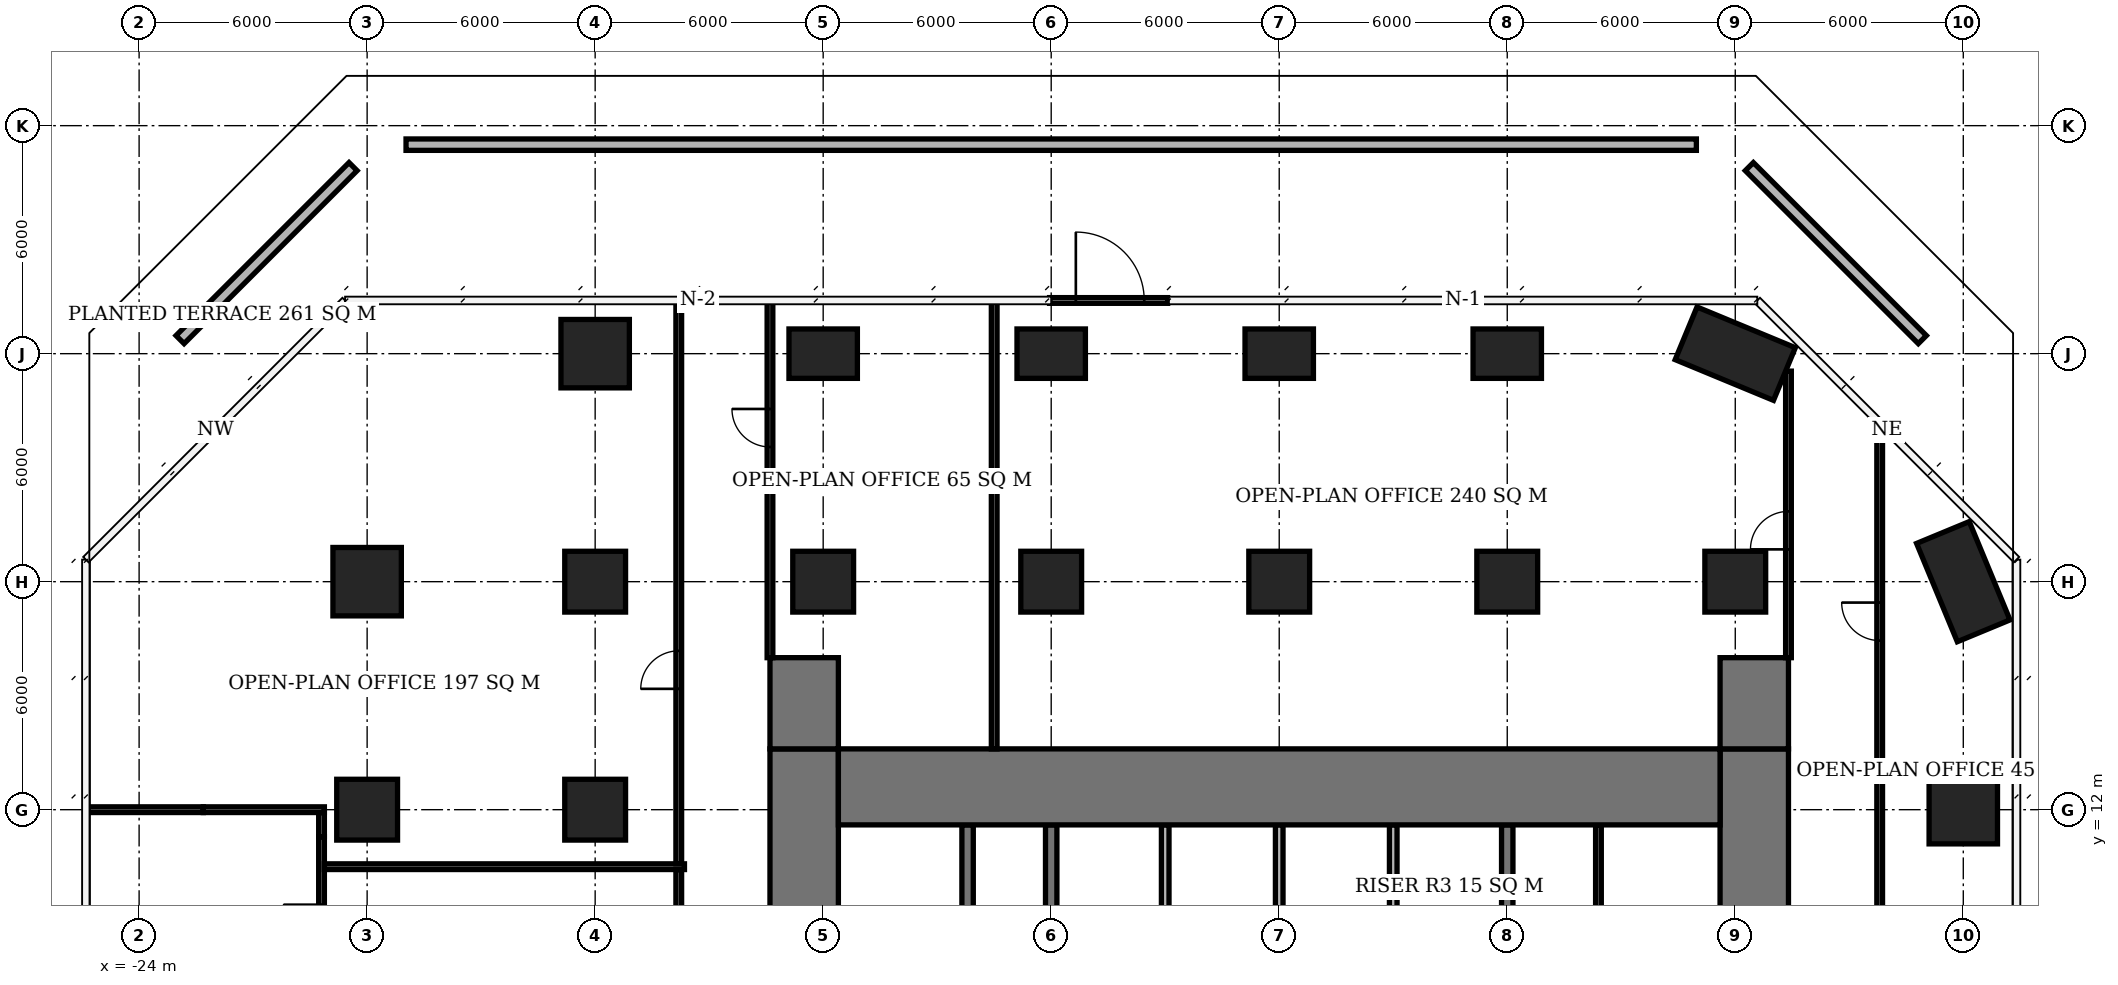
"""IFC4 building model, lengths in metres.
Left out: names, types, materials, properties, quantities, classifications, styles, units other than length and angle.
Written with IfcOpenShell. Run it as: python <this file> out.ifc"""

import sys

from ifc_helpers import new_model, si_unit, direction, frame, frame_2d, origin, origin_2d, place, context, subcontext, project, spatial, rectangle, extrude, element, fill, save


model = new_model("IFC4")
c1 = context("Model", 3, precision=1e-05, world=origin(), true_north=direction((0.0, 1.0)))
c2 = subcontext(c1, "Body", "Model", "MODEL_VIEW")
j1 = project(units=[si_unit("LENGTHUNIT", "METRE"), si_unit("PLANEANGLEUNIT", "RADIAN")], contexts=[c1])
p1 = place(None, origin())
s1 = spatial("IfcSite", under=j1, at=p1, CompositionType="ELEMENT")
p2 = place(p1, origin())
s2 = spatial("IfcBuilding", under=s1, at=p2, CompositionType="ELEMENT")
p3 = place(p2, frame((0.0, 0.0, 117.2)))
s3 = spatial("IfcBuildingStorey", under=s2, at=p3, CompositionType="ELEMENT", Elevation=117.2)
p4 = place(p3, frame((-18.0, 12.0, 0.0), z_axis=(0.0, 0.0, 1.0), x_axis=(1.0, 0.0, 0.0)))
e1 = element("IfcColumn", 1, at=p4, inside=s3, PredefinedType="COLUMN", context=c2, shape_type="SweptSolid", body=[
    extrude(rectangle(XDim=1.6, YDim=1.6, at=origin_2d()), origin(), (0.0, 0.0, 1.0), 3.9),
])
p5 = place(p3, frame((-18.0, 18.0, 0.0), z_axis=(0.0, 0.0, 1.0), x_axis=(1.0, 0.0, 0.0)))
e2 = element("IfcColumn", 2, at=p5, inside=s3, PredefinedType="COLUMN", context=c2, shape_type="SweptSolid", body=[
    extrude(rectangle(XDim=1.8, YDim=1.8, at=origin_2d()), origin(), (0.0, 0.0, 1.0), 3.9),
])
for number, where, z_axis, x_axis in (
    (3, (-12.0, 12.0, 0.0), (0.0, 0.0, 1.0), (1.0, 0.0, 0.0)),
    (4, (-12.0, 18.0, 0.0), (0.0, 0.0, 1.0), (1.0, 0.0, 0.0)),
):
    element("IfcColumn", number, at=place(p3, frame(where, z_axis=z_axis, x_axis=x_axis)), inside=s3, PredefinedType="COLUMN", context=c2, shape_type="SweptSolid", body=[
        extrude(rectangle(XDim=1.6, YDim=1.6, at=origin_2d()), origin(), (0.0, 0.0, 1.0), 3.9),
    ])
p6 = place(p3, frame((-12.0, 24.0, 0.0), z_axis=(0.0, 0.0, 1.0), x_axis=(1.0, 0.0, 0.0)))
e5 = element("IfcColumn", 5, at=p6, inside=s3, PredefinedType="COLUMN", context=c2, shape_type="SweptSolid", body=[
    extrude(rectangle(XDim=1.8, YDim=1.8, at=origin_2d()), origin(), (0.0, 0.0, 1.0), 3.9),
])
p7 = place(p3, frame((-6.0, 18.0, 0.0), z_axis=(0.0, 0.0, 1.0), x_axis=(1.0, 0.0, 0.0)))
e6 = element("IfcColumn", 6, at=p7, inside=s3, PredefinedType="COLUMN", context=c2, shape_type="SweptSolid", body=[
    extrude(rectangle(XDim=1.6, YDim=1.6, at=origin_2d()), origin(), (0.0, 0.0, 1.0), 3.9),
])
p8 = place(p3, frame((-6.0, 24.0, 0.0), z_axis=(0.0, 0.0, 1.0), x_axis=(1.0, 0.0, 0.0)))
e7 = element("IfcColumn", 7, at=p8, inside=s3, PredefinedType="COLUMN", context=c2, shape_type="SweptSolid", body=[
    extrude(rectangle(XDim=1.8, YDim=1.3, at=origin_2d()), origin(), (0.0, 0.0, 1.0), 3.9),
])
p9 = place(p3, frame((0.0, 18.0, 0.0), z_axis=(0.0, 0.0, 1.0), x_axis=(1.0, 0.0, 0.0)))
e8 = element("IfcColumn", 8, at=p9, inside=s3, PredefinedType="COLUMN", context=c2, shape_type="SweptSolid", body=[
    extrude(rectangle(XDim=1.6, YDim=1.6, at=origin_2d()), origin(), (0.0, 0.0, 1.0), 3.9),
])
p10 = place(p3, frame((0.0, 24.0, 0.0), z_axis=(0.0, 0.0, 1.0), x_axis=(1.0, 0.0, 0.0)))
e9 = element("IfcColumn", 9, at=p10, inside=s3, PredefinedType="COLUMN", context=c2, shape_type="SweptSolid", body=[
    extrude(rectangle(XDim=1.8, YDim=1.3, at=origin_2d()), origin(), (0.0, 0.0, 1.0), 3.9),
])
p11 = place(p3, frame((6.0, 18.0, 0.0), z_axis=(0.0, 0.0, 1.0), x_axis=(1.0, 0.0, 0.0)))
e10 = element("IfcColumn", 10, at=p11, inside=s3, PredefinedType="COLUMN", context=c2, shape_type="SweptSolid", body=[
    extrude(rectangle(XDim=1.6, YDim=1.6, at=origin_2d()), origin(), (0.0, 0.0, 1.0), 3.9),
])
p12 = place(p3, frame((6.0, 24.0, 0.0), z_axis=(0.0, 0.0, 1.0), x_axis=(1.0, 0.0, 0.0)))
e11 = element("IfcColumn", 11, at=p12, inside=s3, PredefinedType="COLUMN", context=c2, shape_type="SweptSolid", body=[
    extrude(rectangle(XDim=1.8, YDim=1.3, at=origin_2d()), origin(), (0.0, 0.0, 1.0), 3.9),
])
p13 = place(p3, frame((12.0, 18.0, 0.0), z_axis=(0.0, 0.0, 1.0), x_axis=(1.0, 0.0, 0.0)))
e12 = element("IfcColumn", 12, at=p13, inside=s3, PredefinedType="COLUMN", context=c2, shape_type="SweptSolid", body=[
    extrude(rectangle(XDim=1.6, YDim=1.6, at=origin_2d()), origin(), (0.0, 0.0, 1.0), 3.9),
])
p14 = place(p3, frame((12.0, 24.0, 0.0), z_axis=(0.0, 0.0, 1.0), x_axis=(1.0, 0.0, 0.0)))
e13 = element("IfcColumn", 13, at=p14, inside=s3, PredefinedType="COLUMN", context=c2, shape_type="SweptSolid", body=[
    extrude(rectangle(XDim=1.8, YDim=1.3, at=origin_2d()), origin(), (0.0, 0.0, 1.0), 3.9),
])
p15 = place(p3, frame((18.0, 18.0, 0.0), z_axis=(0.0, 0.0, 1.0), x_axis=(1.0, 0.0, 0.0)))
e14 = element("IfcColumn", 14, at=p15, inside=s3, PredefinedType="COLUMN", context=c2, shape_type="SweptSolid", body=[
    extrude(rectangle(XDim=1.6, YDim=1.6, at=origin_2d()), origin(), (0.0, 0.0, 1.0), 3.9),
])
p16 = place(p3, frame((18.0, 24.0, 0.0), z_axis=(0.0, 0.0, 1.0), x_axis=(0.923879532511, -0.382683432365, 0.0)))
e15 = element("IfcColumn", 15, at=p16, inside=s3, PredefinedType="COLUMN", context=c2, shape_type="SweptSolid", body=[
    extrude(rectangle(XDim=2.8, YDim=1.5, at=origin_2d()), origin(), (0.0, 0.0, 1.0), 3.9),
])
p17 = place(p3, frame((24.0, 12.0, 0.0), z_axis=(0.0, 0.0, 1.0), x_axis=(1.0, 0.0, 0.0)))
e16 = element("IfcColumn", 16, at=p17, inside=s3, PredefinedType="COLUMN", context=c2, shape_type="SweptSolid", body=[
    extrude(rectangle(XDim=1.8, YDim=1.8, at=origin_2d()), origin(), (0.0, 0.0, 1.0), 3.9),
])
p18 = place(p3, frame((24.0, 18.0, 0.0), z_axis=(0.0, 0.0, 1.0), x_axis=(0.382683432365, -0.923879532511, 0.0)))
e17 = element("IfcColumn", 17, at=p18, inside=s3, PredefinedType="COLUMN", context=c2, shape_type="SweptSolid", body=[
    extrude(rectangle(XDim=2.8, YDim=1.5, at=origin_2d()), origin(), (0.0, 0.0, 1.0), 3.9),
])
p19 = place(p3, frame((-5.6, 12.6, 0.0), z_axis=(0.0, 0.0, 1.0), x_axis=(1.0, 0.0, 0.0)))
e18 = element("IfcWall", 18, at=p19, inside=s3, PredefinedType="SHEAR", context=c2, shape_type="SweptSolid", body=[
    extrude(rectangle(XDim=23.2, YDim=2.0, at=frame_2d((11.6, 0.0))), origin(), (0.0, 0.0, 1.0), 3.9),
])
p20 = place(p3, frame((-6.5, -7.6, 0.0), z_axis=(0.0, 0.0, 1.0), x_axis=(0.0, 1.0, 0.0)))
e19 = element("IfcWall", 19, at=p20, inside=s3, PredefinedType="SHEAR", context=c2, shape_type="SweptSolid", body=[
    extrude(rectangle(XDim=21.2, YDim=1.8, at=frame_2d((10.6, 0.0))), origin(), (0.0, 0.0, 1.0), 3.9),
])
p21 = place(p20, frame((7.8, 0.0, 0.0)))
e20 = element("IfcOpeningElement", 20, at=p21, cuts=e19, PredefinedType="OPENING", context=c2, shape_type="SweptSolid", body=[
    extrude(rectangle(XDim=1.8, YDim=2.4, at=frame_2d((0.9, 1.2))), frame((0.0, 0.91, 0.0), z_axis=(0.0, -1.0, 0.0), x_axis=(1.0, 0.0, 0.0)), (0.0, 0.0, 1.0), 1.82),
])
p22 = place(p3, frame((18.5, -7.6, 0.0), z_axis=(0.0, 0.0, 1.0), x_axis=(0.0, 1.0, 0.0)))
e21 = element("IfcWall", 21, at=p22, inside=s3, PredefinedType="SHEAR", context=c2, shape_type="SweptSolid", body=[
    extrude(rectangle(XDim=21.2, YDim=1.8, at=frame_2d((10.6, 0.0))), origin(), (0.0, 0.0, 1.0), 3.9),
])
p23 = place(p22, frame((9.2, 0.0, 0.0)))
e22 = element("IfcOpeningElement", 22, at=p23, cuts=e21, PredefinedType="OPENING", context=c2, shape_type="SweptSolid", body=[
    extrude(rectangle(XDim=1.8, YDim=2.4, at=frame_2d((0.9, 1.2))), frame((0.0, 0.91, 0.0), z_axis=(0.0, -1.0, 0.0), x_axis=(1.0, 0.0, 0.0)), (0.0, 0.0, 1.0), 1.82),
])
for number, where, z_axis, x_axis in (
    (23, (-6.5, 13.6, 0.0), (0.0, 0.0, 1.0), (0.0, 1.0, 0.0)),
    (24, (18.5, 13.6, 0.0), (0.0, 0.0, 1.0), (0.0, 1.0, 0.0)),
):
    element("IfcWall", number, at=place(p3, frame(where, z_axis=z_axis, x_axis=x_axis)), inside=s3, PredefinedType="SHEAR", context=c2, shape_type="SweptSolid", body=[
        extrude(rectangle(XDim=2.4, YDim=1.8, at=frame_2d((1.2, 0.0))), origin(), (0.0, 0.0, 1.0), 3.9),
    ])
p24 = place(p3, frame((0.0, 3.15, 0.0), z_axis=(0.0, 0.0, 1.0), x_axis=(0.0, 1.0, 0.0)))
e25 = element("IfcWall", 25, at=p24, inside=s3, PredefinedType="SHEAR", context=c2, shape_type="SweptSolid", body=[
    extrude(rectangle(XDim=8.45, YDim=0.3, at=frame_2d((4.225, 0.0))), origin(), (0.0, 0.0, 1.0), 3.9),
])
p25 = place(p3, frame((12.0, 6.15, 0.0), z_axis=(0.0, 0.0, 1.0), x_axis=(0.0, 1.0, 0.0)))
e26 = element("IfcWall", 26, at=p25, inside=s3, PredefinedType="SHEAR", context=c2, shape_type="SweptSolid", body=[
    extrude(rectangle(XDim=5.45, YDim=0.3, at=frame_2d((2.725, 0.0))), origin(), (0.0, 0.0, 1.0), 3.9),
])
p26 = place(p3, frame((-2.2, 3.15, 0.0), z_axis=(0.0, 0.0, 1.0), x_axis=(0.0, 1.0, 0.0)))
e27 = element("IfcWall", 27, at=p26, inside=s3, PredefinedType="SHEAR", context=c2, shape_type="SweptSolid", body=[
    extrude(rectangle(XDim=8.45, YDim=0.3, at=frame_2d((4.225, 0.0))), origin(), (0.0, 0.0, 1.0), 3.9),
])
for number, where, z_axis, x_axis in (
    (28, (3.0, 6.15, 0.0), (0.0, 0.0, 1.0), (0.0, 1.0, 0.0)),
    (29, (6.0, 6.15, 0.0), (0.0, 0.0, 1.0), (0.0, 1.0, 0.0)),
    (30, (9.0, 6.15, 0.0), (0.0, 0.0, 1.0), (0.0, 1.0, 0.0)),
):
    element("IfcWall", number, at=place(p3, frame(where, z_axis=z_axis, x_axis=x_axis)), inside=s3, PredefinedType="SOLIDWALL", context=c2, shape_type="SweptSolid", body=[
        extrude(rectangle(XDim=5.45, YDim=0.2, at=frame_2d((2.725, 0.0))), origin(), (0.0, 0.0, 1.0), 3.9),
    ])
p27 = place(p3, frame((-0.042, 25.4, 0.0), z_axis=(0.0, 0.0, 1.0), x_axis=(1.0, 0.0, 0.0)))
e31 = element("IfcWall", 31, at=p27, inside=s3, PredefinedType="USERDEFINED", context=c2, shape_type="SweptSolid", body=[
    extrude(rectangle(XDim=3.107, YDim=0.15, at=frame_2d((1.553, 0.0))), origin(), (0.0, 0.0, 1.0), 3.9),
])
p28 = place(p27, frame((0.691, 0.0, 0.0)))
e32 = element("IfcOpeningElement", 32, at=p28, cuts=e31, PredefinedType="OPENING", context=c2, shape_type="SweptSolid", body=[
    extrude(rectangle(XDim=1.8, YDim=2.4, at=frame_2d((0.9, 1.2))), frame((0.0, 0.085, 0.0), z_axis=(0.0, -1.0, 0.0), x_axis=(1.0, 0.0, 0.0)), (0.0, 0.0, 1.0), 0.17),
])
p29 = place(p3, frame((-22.923, 24.37, 0.0), z_axis=(0.0, 0.0, 1.0), x_axis=(0.707106781187, 0.707106781187, 0.0)))
e33 = element("IfcWall", 33, at=p29, inside=s3, PredefinedType="USERDEFINED", context=c2, shape_type="SweptSolid", body=[
    extrude(rectangle(XDim=6.438, YDim=0.3, at=frame_2d((3.219, 0.0))), origin(), (0.0, 0.0, 1.0), 0.6),
])
p30 = place(p3, frame((-16.976, 29.5, 0.0), z_axis=(0.0, 0.0, 1.0), x_axis=(1.0, 0.0, 0.0)))
e34 = element("IfcWall", 34, at=p30, inside=s3, PredefinedType="USERDEFINED", context=c2, shape_type="SweptSolid", body=[
    extrude(rectangle(XDim=33.953, YDim=0.3, at=frame_2d((16.976, 0.0))), origin(), (0.0, 0.0, 1.0), 0.6),
])
p31 = place(p3, frame((18.37, 28.923, 0.0), z_axis=(0.0, 0.0, 1.0), x_axis=(0.707106781187, -0.707106781187, 0.0)))
e35 = element("IfcWall", 35, at=p31, inside=s3, PredefinedType="USERDEFINED", context=c2, shape_type="SweptSolid", body=[
    extrude(rectangle(XDim=6.438, YDim=0.3, at=frame_2d((3.219, 0.0))), origin(), (0.0, 0.0, 1.0), 0.6),
])
p32 = place(p3, frame((14.4, 6.15, 0.0), z_axis=(0.0, 0.0, 1.0), x_axis=(0.0, 1.0, 0.0)))
e36 = element("IfcWall", 36, at=p32, inside=s3, PredefinedType="PLUMBINGWALL", context=c2, shape_type="SweptSolid", body=[
    extrude(rectangle(XDim=5.45, YDim=0.15, at=frame_2d((2.725, 0.0))), origin(), (0.0, 0.0, 1.0), 3.65),
])
p33 = place(p3, frame((-25.4, 12.0, 0.0), z_axis=(0.0, 0.0, 1.0), x_axis=(1.0, 0.0, 0.0)))
e37 = element("IfcWall", 37, at=p33, inside=s3, PredefinedType="PARTITIONING", context=c2, shape_type="SweptSolid", body=[
    extrude(rectangle(XDim=3.09, YDim=0.15, at=frame_2d((1.545, 0.0))), origin(), (0.0, 0.0, 1.0), 3.65),
])
p34 = place(p3, frame((-22.31, 12.0, 0.0), z_axis=(0.0, 0.0, 1.0), x_axis=(1.0, 0.0, 0.0)))
e38 = element("IfcWall", 38, at=p34, inside=s3, PredefinedType="PARTITIONING", context=c2, shape_type="SweptSolid", body=[
    extrude(rectangle(XDim=3.185, YDim=0.15, at=frame_2d((1.593, 0.0))), origin(), (0.0, 0.0, 1.0), 2.65),
])
p35 = place(p3, frame((-19.2, 6.71, 0.0), z_axis=(0.0, 0.0, 1.0), x_axis=(0.0, 1.0, 0.0)))
e39 = element("IfcWall", 39, at=p35, inside=s3, PredefinedType="PARTITIONING", context=c2, shape_type="SweptSolid", body=[
    extrude(rectangle(XDim=4.58, YDim=0.15, at=frame_2d((2.29, 0.0))), origin(), (0.0, 0.0, 1.0), 3.65),
])
p36 = place(p35, frame((1.79, 0.0, 0.0)))
e40 = element("IfcOpeningElement", 40, at=p36, cuts=e39, PredefinedType="OPENING", context=c2, shape_type="SweptSolid", body=[
    extrude(rectangle(XDim=1.0, YDim=2.1, at=frame_2d((0.5, 1.05))), frame((0.0, 0.085, 0.0), z_axis=(0.0, -1.0, 0.0), x_axis=(1.0, 0.0, 0.0)), (0.0, 0.0, 1.0), 0.17),
])
p37 = place(p3, frame((-19.2, 11.29, 0.0), z_axis=(0.0, 0.0, 1.0), x_axis=(0.0, 1.0, 0.0)))
e41 = element("IfcWall", 41, at=p37, inside=s3, PredefinedType="PARTITIONING", context=c2, shape_type="SweptSolid", body=[
    extrude(rectangle(XDim=0.635, YDim=0.15, at=frame_2d((0.317, 0.0))), origin(), (0.0, 0.0, 1.0), 2.65),
])
p38 = place(p3, frame((-19.125, 10.5, 0.0), z_axis=(0.0, 0.0, 1.0), x_axis=(1.0, 0.0, 0.0)))
e42 = element("IfcWall", 42, at=p38, inside=s3, PredefinedType="PARTITIONING", context=c2, shape_type="SweptSolid", body=[
    extrude(rectangle(XDim=9.475, YDim=0.15, at=frame_2d((4.738, 0.0))), origin(), (0.0, 0.0, 1.0), 3.65),
])
p39 = place(p3, frame((-9.8, 4.575, 0.0), z_axis=(0.0, 0.0, 1.0), x_axis=(0.0, 1.0, 0.0)))
e43 = element("IfcWall", 43, at=p39, inside=s3, PredefinedType="PARTITIONING", context=c2, shape_type="SweptSolid", body=[
    extrude(rectangle(XDim=5.85, YDim=0.15, at=frame_2d((2.925, 0.0))), origin(), (0.0, 0.0, 1.0), 3.65),
])
p40 = place(p39, frame((1.525, 0.0, 0.0)))
e44 = element("IfcOpeningElement", 44, at=p40, cuts=e43, PredefinedType="OPENING", context=c2, shape_type="SweptSolid", body=[
    extrude(rectangle(XDim=1.0, YDim=2.1, at=frame_2d((0.5, 1.05))), frame((0.0, 0.085, 0.0), z_axis=(0.0, -1.0, 0.0), x_axis=(1.0, 0.0, 0.0)), (0.0, 0.0, 1.0), 0.17),
])
p41 = place(p3, frame((-9.8, 10.575, 0.0), z_axis=(0.0, 0.0, 1.0), x_axis=(0.0, 1.0, 0.0)))
e45 = element("IfcWall", 45, at=p41, inside=s3, PredefinedType="PARTITIONING", context=c2, shape_type="SweptSolid", body=[
    extrude(rectangle(XDim=14.825, YDim=0.15, at=frame_2d((7.413, 0.0))), origin(), (0.0, 0.0, 1.0), 3.65),
])
p42 = place(p41, frame((4.605, 0.0, 0.0)))
e46 = element("IfcOpeningElement", 46, at=p42, cuts=e45, PredefinedType="OPENING", context=c2, shape_type="SweptSolid", body=[
    extrude(rectangle(XDim=1.0, YDim=2.1, at=frame_2d((0.5, 1.05))), frame((0.0, 0.085, 0.0), z_axis=(0.0, -1.0, 0.0), x_axis=(1.0, 0.0, 0.0)), (0.0, 0.0, 1.0), 0.17),
])
p43 = place(p3, frame((-7.4, 16.0, 0.0), z_axis=(0.0, 0.0, 1.0), x_axis=(0.0, 1.0, 0.0)))
e47 = element("IfcWall", 47, at=p43, inside=s3, PredefinedType="PARTITIONING", context=c2, shape_type="SweptSolid", body=[
    extrude(rectangle(XDim=9.4, YDim=0.15, at=frame_2d((4.7, 0.0))), origin(), (0.0, 0.0, 1.0), 3.65),
])
p44 = place(p43, frame((5.545, 0.0, 0.0)))
e48 = element("IfcOpeningElement", 48, at=p44, cuts=e47, PredefinedType="OPENING", context=c2, shape_type="SweptSolid", body=[
    extrude(rectangle(XDim=1.0, YDim=2.1, at=frame_2d((0.5, 1.05))), frame((0.0, 0.085, 0.0), z_axis=(0.0, -1.0, 0.0), x_axis=(1.0, 0.0, 0.0)), (0.0, 0.0, 1.0), 0.17),
])
p45 = place(p3, frame((-1.5, 13.6, 0.0), z_axis=(0.0, 0.0, 1.0), x_axis=(0.0, 1.0, 0.0)))
e49 = element("IfcWall", 49, at=p45, inside=s3, PredefinedType="PARTITIONING", context=c2, shape_type="SweptSolid", body=[
    extrude(rectangle(XDim=11.8, YDim=0.15, at=frame_2d((5.9, 0.0))), origin(), (0.0, 0.0, 1.0), 3.65),
])
p46 = place(p3, frame((19.4, 16.0, 0.0), z_axis=(0.0, 0.0, 1.0), x_axis=(0.0, 1.0, 0.0)))
e50 = element("IfcWall", 50, at=p46, inside=s3, PredefinedType="PARTITIONING", context=c2, shape_type="SweptSolid", body=[
    extrude(rectangle(XDim=7.541, YDim=0.15, at=frame_2d((3.77, 0.0))), origin(), (0.0, 0.0, 1.0), 3.65),
])
p47 = place(p46, frame((2.85, 0.0, 0.0)))
e51 = element("IfcOpeningElement", 51, at=p47, cuts=e50, PredefinedType="OPENING", context=c2, shape_type="SweptSolid", body=[
    extrude(rectangle(XDim=1.0, YDim=2.1, at=frame_2d((0.5, 1.05))), frame((0.0, 0.085, 0.0), z_axis=(0.0, -1.0, 0.0), x_axis=(1.0, 0.0, 0.0)), (0.0, 0.0, 1.0), 0.17),
])
p48 = place(p3, frame((21.8, 7.575, 0.0), z_axis=(0.0, 0.0, 1.0), x_axis=(0.0, 1.0, 0.0)))
e52 = element("IfcWall", 52, at=p48, inside=s3, PredefinedType="PARTITIONING", context=c2, shape_type="SweptSolid", body=[
    extrude(rectangle(XDim=14.514, YDim=0.15, at=frame_2d((7.257, 0.0))), origin(), (0.0, 0.0, 1.0), 3.65),
])
p49 = place(p48, frame((8.875, 0.0, 0.0)))
e53 = element("IfcOpeningElement", 53, at=p49, cuts=e52, PredefinedType="OPENING", context=c2, shape_type="SweptSolid", body=[
    extrude(rectangle(XDim=1.0, YDim=2.1, at=frame_2d((0.5, 1.05))), frame((0.0, 0.085, 0.0), z_axis=(0.0, -1.0, 0.0), x_axis=(1.0, 0.0, 0.0)), (0.0, 0.0, 1.0), 0.17),
])
p50 = place(p28, origin())
e54 = element("IfcDoor", 54, at=p50, inside=s3, OperationType="DOUBLE_DOOR_SINGLE_SWING", PredefinedType="DOOR", context=c2, shape_type="SweptSolid", body=[
    extrude(rectangle(XDim=1.8, YDim=2.4, at=frame_2d((0.9, 1.2))), frame((0.0, 0.025, 0.0), z_axis=(0.0, -1.0, 0.0), x_axis=(1.0, 0.0, 0.0)), (0.0, 0.0, 1.0), 0.05),
])
fill(e32, e54)
p51 = place(p49, origin())
e55 = element("IfcDoor", 55, at=p51, inside=s3, OperationType="SINGLE_SWING_RIGHT", PredefinedType="DOOR", context=c2, shape_type="SweptSolid", body=[
    extrude(rectangle(XDim=1.0, YDim=2.1, at=frame_2d((0.5, 1.05))), frame((0.0, 0.025, 0.0), z_axis=(0.0, -1.0, 0.0), x_axis=(1.0, 0.0, 0.0)), (0.0, 0.0, 1.0), 0.05),
])
fill(e53, e55)
p52 = place(p42, origin())
e56 = element("IfcDoor", 56, at=p52, inside=s3, OperationType="SINGLE_SWING_LEFT", PredefinedType="DOOR", context=c2, shape_type="SweptSolid", body=[
    extrude(rectangle(XDim=1.0, YDim=2.1, at=frame_2d((0.5, 1.05))), frame((0.0, 0.025, 0.0), z_axis=(0.0, -1.0, 0.0), x_axis=(1.0, 0.0, 0.0)), (0.0, 0.0, 1.0), 0.05),
])
fill(e46, e56)
p53 = place(p44, origin())
e57 = element("IfcDoor", 57, at=p53, inside=s3, OperationType="SINGLE_SWING_RIGHT", PredefinedType="DOOR", context=c2, shape_type="SweptSolid", body=[
    extrude(rectangle(XDim=1.0, YDim=2.1, at=frame_2d((0.5, 1.05))), frame((0.0, 0.025, 0.0), z_axis=(0.0, -1.0, 0.0), x_axis=(1.0, 0.0, 0.0)), (0.0, 0.0, 1.0), 0.05),
])
fill(e48, e57)
p54 = place(p47, origin())
e58 = element("IfcDoor", 58, at=p54, inside=s3, OperationType="SINGLE_SWING_LEFT", PredefinedType="DOOR", context=c2, shape_type="SweptSolid", body=[
    extrude(rectangle(XDim=1.0, YDim=2.1, at=frame_2d((0.5, 1.05))), frame((0.0, 0.025, 0.0), z_axis=(0.0, -1.0, 0.0), x_axis=(1.0, 0.0, 0.0)), (0.0, 0.0, 1.0), 0.05),
])
fill(e51, e58)
save(model, sys.argv[1])
